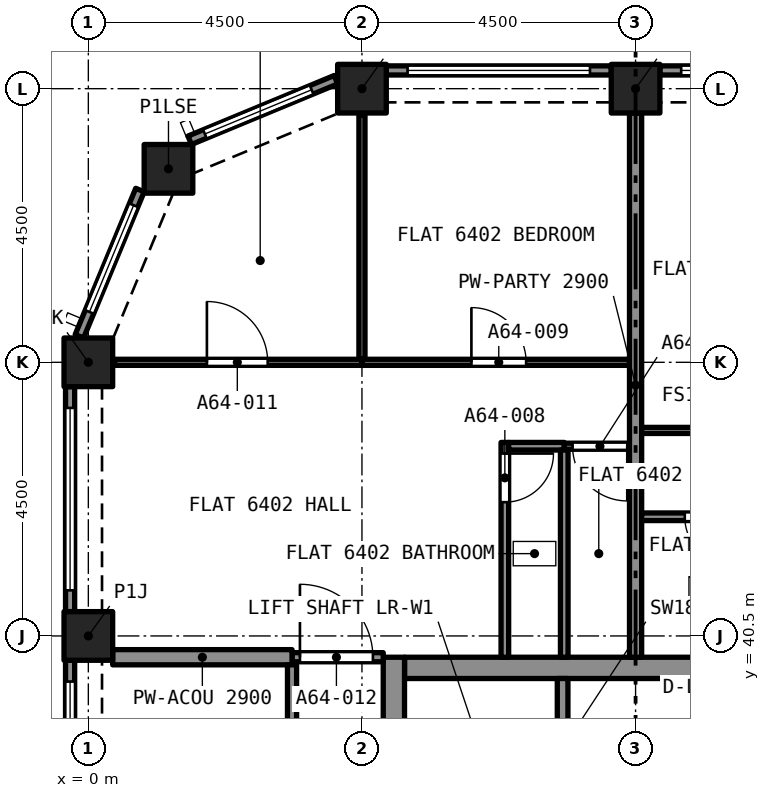
"""IFC4 building model, lengths in metres.
Left out: names, types, materials, properties, quantities, classifications, styles, units other than length and angle.
Written with IfcOpenShell. Run it as: python <this file> out.ifc"""

import sys

from ifc_helpers import new_model, si_unit, direction, frame, frame_2d, origin, origin_2d, place, context, subcontext, project, spatial, rectangle, extrude, element, fill, save


model = new_model("IFC4")
c1 = context("Model", 3, precision=1e-05, world=origin(), true_north=direction((0.0, 1.0)))
c2 = subcontext(c1, "Body", "Model", "MODEL_VIEW")
j1 = project(units=[si_unit("LENGTHUNIT", "METRE"), si_unit("PLANEANGLEUNIT", "RADIAN")], contexts=[c1])
p1 = place(None, origin())
s1 = spatial("IfcSite", under=j1, at=p1, CompositionType="ELEMENT")
p2 = place(p1, origin())
s2 = spatial("IfcBuilding", under=s1, at=p2, CompositionType="ELEMENT")
p3 = place(p2, frame((0.0, 0.0, 229.295)))
s3 = spatial("IfcBuildingStorey", under=s2, at=p3, CompositionType="ELEMENT", Elevation=229.295)
for number, where, z_axis, x_axis in (
    (1, (0.0, 40.5, 0.0), (0.0, 0.0, 1.0), (1.0, 0.0, 0.0)),
    (2, (0.0, 45.0, 0.0), (0.0, 0.0, 1.0), (1.0, 0.0, 0.0)),
    (3, (1.318, 48.182, 0.0), (0.0, 0.0, 1.0), (1.0, 0.0, 0.0)),
    (4, (4.5, 49.5, 0.0), (0.0, 0.0, 1.0), (1.0, 0.0, 0.0)),
    (5, (9.0, 49.5, 0.0), (0.0, 0.0, 1.0), (1.0, 0.0, 0.0)),
):
    element("IfcColumn", number, at=place(p3, frame(where, z_axis=z_axis, x_axis=x_axis)), inside=s3, PredefinedType="COLUMN", context=c2, shape_type="SweptSolid", body=[
        extrude(rectangle(XDim=0.8, YDim=0.8, at=origin_2d()), origin(), (0.0, 0.0, 1.0), 3.2),
    ])
p4 = place(p3, frame((5.2, 39.975, 0.0), z_axis=(0.0, 0.0, 1.0), x_axis=(1.0, 0.0, 0.0)))
e6 = element("IfcWall", 6, at=p4, inside=s3, PredefinedType="SOLIDWALL", context=c2, shape_type="SweptSolid", body=[
    extrude(rectangle(XDim=7.6, YDim=0.35, at=frame_2d((3.8, 0.0))), origin(), (0.0, 0.0, 1.0), 3.2),
])
p5 = place(p3, frame((5.025, 27.35, 0.0), z_axis=(0.0, 0.0, 1.0), x_axis=(0.0, 1.0, 0.0)))
e7 = element("IfcWall", 7, at=p5, inside=s3, PredefinedType="SOLIDWALL", context=c2, shape_type="SweptSolid", body=[
    extrude(rectangle(XDim=12.8, YDim=0.35, at=frame_2d((6.4, 0.0))), origin(), (0.0, 0.0, 1.0), 3.2),
])
p6 = place(p5, frame((8.6, 0.0, 0.0)))
e8 = element("IfcOpeningElement", 8, at=p6, cuts=e7, PredefinedType="OPENING", context=c2, shape_type="SweptSolid", body=[
    extrude(rectangle(XDim=1.2, YDim=2.1, at=frame_2d((0.6, 1.05))), frame((0.0, 0.185, 0.0), z_axis=(0.0, -1.0, 0.0), x_axis=(1.0, 0.0, 0.0)), (0.0, 0.0, 1.0), 0.37),
])
p7 = place(p3, frame((9.4, 49.8, 0.0), z_axis=(0.0, 0.0, 1.0), x_axis=(1.0, 0.0, 0.0)))
e9 = element("IfcWall", 9, at=p7, inside=s3, PredefinedType="SOLIDWALL", context=c2, shape_type="SweptSolid", body=[
    extrude(rectangle(XDim=3.7, YDim=0.15, at=frame_2d((1.85, 0.0))), origin(), (0.0, 0.0, 1.0), 3.2),
])
p8 = place(p7, frame((0.35, 0.0, 0.45)))
e10 = element("IfcOpeningElement", 10, at=p8, cuts=e9, PredefinedType="OPENING", context=c2, shape_type="SweptSolid", body=[
    extrude(rectangle(XDim=3.0, YDim=1.95, at=frame_2d((1.5, 0.975))), frame((0.0, 0.085, 0.0), z_axis=(0.0, -1.0, 0.0), x_axis=(1.0, 0.0, 0.0)), (0.0, 0.0, 1.0), 0.17),
])
p9 = place(p3, frame((4.9, 49.8, 0.0), z_axis=(0.0, 0.0, 1.0), x_axis=(1.0, 0.0, 0.0)))
e11 = element("IfcWall", 11, at=p9, inside=s3, PredefinedType="SOLIDWALL", context=c2, shape_type="SweptSolid", body=[
    extrude(rectangle(XDim=3.7, YDim=0.15, at=frame_2d((1.85, 0.0))), origin(), (0.0, 0.0, 1.0), 3.2),
])
p10 = place(p9, frame((0.35, 0.0, 0.45)))
e12 = element("IfcOpeningElement", 12, at=p10, cuts=e11, PredefinedType="OPENING", context=c2, shape_type="SweptSolid", body=[
    extrude(rectangle(XDim=3.0, YDim=1.95, at=frame_2d((1.5, 0.975))), frame((0.0, 0.085, 0.0), z_axis=(0.0, -1.0, 0.0), x_axis=(1.0, 0.0, 0.0)), (0.0, 0.0, 1.0), 0.17),
])
p11 = place(p3, frame((1.667, 48.651, 0.0), z_axis=(0.0, 0.0, 1.0), x_axis=(0.923885342263, 0.382669406082, 0.0)))
e13 = element("IfcWall", 13, at=p11, inside=s3, PredefinedType="SOLIDWALL", context=c2, shape_type="SweptSolid", body=[
    extrude(rectangle(XDim=2.602, YDim=0.15, at=frame_2d((1.301, 0.0))), origin(), (0.0, 0.0, 1.0), 3.2),
])
p12 = place(p11, frame((0.27, 0.0, 0.45)))
e14 = element("IfcOpeningElement", 14, at=p12, cuts=e13, PredefinedType="OPENING", context=c2, shape_type="SweptSolid", body=[
    extrude(rectangle(XDim=1.9, YDim=1.95, at=frame_2d((0.95, 0.975))), frame((0.0, 0.085, 0.0), z_axis=(0.0, -1.0, 0.0), x_axis=(1.0, 0.0, 0.0)), (0.0, 0.0, 1.0), 0.17),
])
p13 = place(p3, frame((-0.147, 45.429, 0.0), z_axis=(0.0, 0.0, 1.0), x_axis=(0.382669406082, 0.923885342263, 0.0)))
e15 = element("IfcWall", 15, at=p13, inside=s3, PredefinedType="SOLIDWALL", context=c2, shape_type="SweptSolid", body=[
    extrude(rectangle(XDim=2.602, YDim=0.15, at=frame_2d((1.301, 0.0))), origin(), (0.0, 0.0, 1.0), 3.2),
])
p14 = place(p13, frame((0.432, 0.0, 0.45)))
e16 = element("IfcOpeningElement", 16, at=p14, cuts=e15, PredefinedType="OPENING", context=c2, shape_type="SweptSolid", body=[
    extrude(rectangle(XDim=1.9, YDim=1.95, at=frame_2d((0.95, 0.975))), frame((0.0, 0.085, 0.0), z_axis=(0.0, -1.0, 0.0), x_axis=(1.0, 0.0, 0.0)), (0.0, 0.0, 1.0), 0.17),
])
p15 = place(p3, frame((-0.3, 40.9, 0.0), z_axis=(0.0, 0.0, 1.0), x_axis=(0.0, 1.0, 0.0)))
e17 = element("IfcWall", 17, at=p15, inside=s3, PredefinedType="SOLIDWALL", context=c2, shape_type="SweptSolid", body=[
    extrude(rectangle(XDim=3.7, YDim=0.15, at=frame_2d((1.85, 0.0))), origin(), (0.0, 0.0, 1.0), 3.2),
])
p16 = place(p15, frame((0.35, 0.0, 0.45)))
e18 = element("IfcOpeningElement", 18, at=p16, cuts=e17, PredefinedType="OPENING", context=c2, shape_type="SweptSolid", body=[
    extrude(rectangle(XDim=3.0, YDim=1.95, at=frame_2d((1.5, 0.975))), frame((0.0, 0.085, 0.0), z_axis=(0.0, -1.0, 0.0), x_axis=(1.0, 0.0, 0.0)), (0.0, 0.0, 1.0), 0.17),
])
p17 = place(p3, frame((-0.3, 36.4, 0.0), z_axis=(0.0, 0.0, 1.0), x_axis=(0.0, 1.0, 0.0)))
e19 = element("IfcWall", 19, at=p17, inside=s3, PredefinedType="SOLIDWALL", context=c2, shape_type="SweptSolid", body=[
    extrude(rectangle(XDim=3.7, YDim=0.15, at=frame_2d((1.85, 0.0))), origin(), (0.0, 0.0, 1.0), 3.2),
])
p18 = place(p17, frame((0.35, 0.0, 0.45)))
e20 = element("IfcOpeningElement", 20, at=p18, cuts=e19, PredefinedType="OPENING", context=c2, shape_type="SweptSolid", body=[
    extrude(rectangle(XDim=3.0, YDim=1.95, at=frame_2d((1.5, 0.975))), frame((0.0, 0.085, 0.0), z_axis=(0.0, -1.0, 0.0), x_axis=(1.0, 0.0, 0.0)), (0.0, 0.0, 1.0), 0.17),
])
p19 = place(p3, frame((6.85, 43.683, 0.0), z_axis=(0.0, 0.0, 1.0), x_axis=(0.0, -1.0, 0.0)))
e21 = element("IfcWall", 21, at=p19, inside=s3, PredefinedType="PARTITIONING", context=c2, shape_type="SweptSolid", body=[
    extrude(rectangle(XDim=3.533, YDim=0.125, at=frame_2d((1.766, 0.0))), origin(), (0.0, 0.0, 1.0), 2.9),
])
p20 = place(p19, frame((0.183, 0.0, 0.0)))
e22 = element("IfcOpeningElement", 22, at=p20, cuts=e21, PredefinedType="OPENING", context=c2, shape_type="SweptSolid", body=[
    extrude(rectangle(XDim=0.8, YDim=2.1, at=frame_2d((0.4, 1.05))), frame((0.0, 0.073, 0.0), z_axis=(0.0, -1.0, 0.0), x_axis=(1.0, 0.0, 0.0)), (0.0, 0.0, 1.0), 0.145),
])
p21 = place(p3, frame((6.913, 43.62, 0.0), z_axis=(0.0, 0.0, 1.0), x_axis=(1.0, 0.0, 0.0)))
e23 = element("IfcWall", 23, at=p21, inside=s3, PredefinedType="PARTITIONING", context=c2, shape_type="SweptSolid", body=[
    extrude(rectangle(XDim=0.915, YDim=0.125, at=frame_2d((0.458, 0.0))), origin(), (0.0, 0.0, 1.0), 2.9),
])
p22 = place(p3, frame((7.827, 40.15, 0.0), z_axis=(0.0, 0.0, 1.0), x_axis=(0.0, 1.0, 0.0)))
e24 = element("IfcWall", 24, at=p22, inside=s3, PredefinedType="PARTITIONING", context=c2, shape_type="SweptSolid", body=[
    extrude(rectangle(XDim=3.408, YDim=0.125, at=frame_2d((1.704, 0.0))), origin(), (0.0, 0.0, 1.0), 2.9),
])
p23 = place(p3, frame((4.5, 45.0, 0.0), z_axis=(0.0, 0.0, 1.0), x_axis=(1.0, 0.0, 0.0)))
e25 = element("IfcWall", 25, at=p23, inside=s3, PredefinedType="PARTITIONING", context=c2, shape_type="SweptSolid", body=[
    extrude(rectangle(XDim=4.4, YDim=0.1, at=frame_2d((2.2, 0.0))), origin(), (0.0, 0.0, 1.0), 2.9),
])
p24 = place(p23, frame((1.8, 0.0, 0.0)))
e26 = element("IfcOpeningElement", 26, at=p24, cuts=e25, PredefinedType="OPENING", context=c2, shape_type="SweptSolid", body=[
    extrude(rectangle(XDim=0.9, YDim=2.1, at=frame_2d((0.45, 1.05))), frame((0.0, 0.06, 0.0), z_axis=(0.0, -1.0, 0.0), x_axis=(1.0, 0.0, 0.0)), (0.0, 0.0, 1.0), 0.12),
])
p25 = place(p3, frame((4.5, 45.05, 0.0), z_axis=(0.0, 0.0, 1.0), x_axis=(0.0, 1.0, 0.0)))
e27 = element("IfcWall", 27, at=p25, inside=s3, PredefinedType="PARTITIONING", context=c2, shape_type="SweptSolid", body=[
    extrude(rectangle(XDim=4.017, YDim=0.1, at=frame_2d((2.009, 0.0))), origin(), (0.0, 0.0, 1.0), 2.9),
])
p26 = place(p3, frame((8.9, 43.62, 0.0), z_axis=(0.0, 0.0, 1.0), x_axis=(-1.0, 0.0, 0.0)))
e28 = element("IfcWall", 28, at=p26, inside=s3, PredefinedType="PARTITIONING", context=c2, shape_type="SweptSolid", body=[
    extrude(rectangle(XDim=1.073, YDim=0.1, at=frame_2d((0.536, 0.0))), origin(), (0.0, 0.0, 1.0), 2.9),
])
p27 = place(p26, frame((0.036, 0.0, 0.0)))
e29 = element("IfcOpeningElement", 29, at=p27, cuts=e28, PredefinedType="OPENING", context=c2, shape_type="SweptSolid", body=[
    extrude(rectangle(XDim=0.9, YDim=2.1, at=frame_2d((0.45, 1.05))), frame((0.0, 0.06, 0.0), z_axis=(0.0, -1.0, 0.0), x_axis=(1.0, 0.0, 0.0)), (0.0, 0.0, 1.0), 0.12),
])
p28 = place(p3, frame((0.433, 45.0, 0.0), z_axis=(0.0, 0.0, 1.0), x_axis=(1.0, 0.0, 0.0)))
e30 = element("IfcWall", 30, at=p28, inside=s3, PredefinedType="PARTITIONING", context=c2, shape_type="SweptSolid", body=[
    extrude(rectangle(XDim=4.067, YDim=0.1, at=frame_2d((2.034, 0.0))), origin(), (0.0, 0.0, 1.0), 2.9),
])
p29 = place(p28, frame((1.517, 0.0, 0.0)))
e31 = element("IfcOpeningElement", 31, at=p29, cuts=e30, PredefinedType="OPENING", context=c2, shape_type="SweptSolid", body=[
    extrude(rectangle(XDim=1.0, YDim=2.1, at=frame_2d((0.5, 1.05))), frame((0.0, 0.06, 0.0), z_axis=(0.0, -1.0, 0.0), x_axis=(1.0, 0.0, 0.0)), (0.0, 0.0, 1.0), 0.12),
])
p30 = place(p3, frame((3.35, 40.15, 0.0), z_axis=(0.0, 0.0, 1.0), x_axis=(1.0, 0.0, 0.0)))
e32 = element("IfcWall", 32, at=p30, inside=s3, PredefinedType="PARTITIONING", context=c2, shape_type="SweptSolid", body=[
    extrude(rectangle(XDim=1.5, YDim=0.15, at=frame_2d((0.75, 0.0))), origin(), (0.0, 0.0, 1.0), 2.9),
])
p31 = place(p30, frame((0.13, 0.0, 0.0)))
e33 = element("IfcOpeningElement", 33, at=p31, cuts=e32, PredefinedType="OPENING", context=c2, shape_type="SweptSolid", body=[
    extrude(rectangle(XDim=1.2, YDim=2.4, at=frame_2d((0.6, 1.2))), frame((0.0, 0.085, 0.0), z_axis=(0.0, -1.0, 0.0), x_axis=(1.0, 0.0, 0.0)), (0.0, 0.0, 1.0), 0.17),
])
p32 = place(p3, frame((0.4, 40.15, 0.0), z_axis=(0.0, 0.0, 1.0), x_axis=(1.0, 0.0, 0.0)))
e34 = element("IfcWall", 34, at=p32, inside=s3, PredefinedType="PARTITIONING", context=c2, shape_type="SweptSolid", body=[
    extrude(rectangle(XDim=2.95, YDim=0.25, at=frame_2d((1.475, 0.0))), origin(), (0.0, 0.0, 1.0), 2.9),
])
p33 = place(p3, frame((9.0, 40.15, 0.0), z_axis=(0.0, 0.0, 1.0), x_axis=(0.0, 1.0, 0.0)))
e35 = element("IfcWall", 35, at=p33, inside=s3, PredefinedType="PARTITIONING", context=c2, shape_type="SweptSolid", body=[
    extrude(rectangle(XDim=8.95, YDim=0.2, at=frame_2d((4.475, 0.0))), origin(), (0.0, 0.0, 1.0), 2.9),
])
p34 = place(p3, frame((11.418, 42.46, 0.0), z_axis=(0.0, 0.0, 1.0), x_axis=(-1.0, 0.0, 0.0)))
e36 = element("IfcWall", 36, at=p34, inside=s3, PredefinedType="PARTITIONING", context=c2, shape_type="SweptSolid", body=[
    extrude(rectangle(XDim=2.318, YDim=0.125, at=frame_2d((1.159, 0.0))), origin(), (0.0, 0.0, 1.0), 2.9),
])
p35 = place(p34, frame((0.809, 0.0, 0.0)))
e37 = element("IfcOpeningElement", 37, at=p35, cuts=e36, PredefinedType="OPENING", context=c2, shape_type="SweptSolid", body=[
    extrude(rectangle(XDim=0.8, YDim=2.1, at=frame_2d((0.4, 1.05))), frame((0.0, 0.073, 0.0), z_axis=(0.0, -1.0, 0.0), x_axis=(1.0, 0.0, 0.0)), (0.0, 0.0, 1.0), 0.145),
])
p36 = place(p3, frame((9.1, 43.88, 0.0), z_axis=(0.0, 0.0, 1.0), x_axis=(1.0, 0.0, 0.0)))
e38 = element("IfcWall", 38, at=p36, inside=s3, PredefinedType="PARTITIONING", context=c2, shape_type="SweptSolid", body=[
    extrude(rectangle(XDim=4.4, YDim=0.1, at=frame_2d((2.2, 0.0))), origin(), (0.0, 0.0, 1.0), 2.9),
])
p37 = place(p36, frame((1.65, 0.0, 0.0)))
e39 = element("IfcOpeningElement", 39, at=p37, cuts=e38, PredefinedType="OPENING", context=c2, shape_type="SweptSolid", body=[
    extrude(rectangle(XDim=1.0, YDim=2.1, at=frame_2d((0.5, 1.05))), frame((0.0, 0.06, 0.0), z_axis=(0.0, -1.0, 0.0), x_axis=(1.0, 0.0, 0.0)), (0.0, 0.0, 1.0), 0.12),
])
p38 = place(p3, frame((3.35, 36.0, 0.0), z_axis=(0.0, 0.0, 1.0), x_axis=(0.0, 1.0, 0.0)))
e40 = element("IfcWall", 40, at=p38, inside=s3, PredefinedType="PARTITIONING", context=c2, shape_type="SweptSolid", body=[
    extrude(rectangle(XDim=4.025, YDim=0.15, at=frame_2d((2.012, 0.0))), origin(), (0.0, 0.0, 1.0), 2.9),
])
p39 = place(p38, frame((1.575, 0.0, 0.0)))
e41 = element("IfcOpeningElement", 41, at=p39, cuts=e40, PredefinedType="OPENING", context=c2, shape_type="SweptSolid", body=[
    extrude(rectangle(XDim=1.0, YDim=2.1, at=frame_2d((0.5, 1.05))), frame((0.0, 0.085, 0.0), z_axis=(0.0, -1.0, 0.0), x_axis=(1.0, 0.0, 0.0)), (0.0, 0.0, 1.0), 0.17),
])
p40 = place(p3, frame((7.8, 37.5, 0.0), z_axis=(0.0, 0.0, 1.0), x_axis=(0.0, 1.0, 0.0)))
e42 = element("IfcWall", 42, at=p40, inside=s3, PredefinedType="SOLIDWALL", context=c2, shape_type="SweptSolid", body=[
    extrude(rectangle(XDim=2.3, YDim=0.175, at=frame_2d((1.15, 0.0))), origin(), (0.0, 0.0, 1.0), 2.9),
])
p41 = place(p8, origin())
e43 = element("IfcWindow", 43, at=p41, inside=s3, PartitioningType="SINGLE_PANEL", PredefinedType="WINDOW", context=c2, shape_type="SweptSolid", body=[
    extrude(rectangle(XDim=3.0, YDim=1.95, at=frame_2d((1.5, 0.975))), frame((0.0, 0.03, 0.0), z_axis=(0.0, -1.0, 0.0), x_axis=(1.0, 0.0, 0.0)), (0.0, 0.0, 1.0), 0.06),
])
fill(e10, e43)
p42 = place(p10, origin())
e44 = element("IfcWindow", 44, at=p42, inside=s3, PartitioningType="SINGLE_PANEL", PredefinedType="WINDOW", context=c2, shape_type="SweptSolid", body=[
    extrude(rectangle(XDim=3.0, YDim=1.95, at=frame_2d((1.5, 0.975))), frame((0.0, 0.03, 0.0), z_axis=(0.0, -1.0, 0.0), x_axis=(1.0, 0.0, 0.0)), (0.0, 0.0, 1.0), 0.06),
])
fill(e12, e44)
p43 = place(p12, origin())
e45 = element("IfcWindow", 45, at=p43, inside=s3, PartitioningType="SINGLE_PANEL", PredefinedType="WINDOW", context=c2, shape_type="SweptSolid", body=[
    extrude(rectangle(XDim=1.9, YDim=1.95, at=frame_2d((0.95, 0.975))), frame((0.0, 0.03, 0.0), z_axis=(0.0, -1.0, 0.0), x_axis=(1.0, 0.0, 0.0)), (0.0, 0.0, 1.0), 0.06),
])
fill(e14, e45)
p44 = place(p14, origin())
e46 = element("IfcWindow", 46, at=p44, inside=s3, PartitioningType="SINGLE_PANEL", PredefinedType="WINDOW", context=c2, shape_type="SweptSolid", body=[
    extrude(rectangle(XDim=1.9, YDim=1.95, at=frame_2d((0.95, 0.975))), frame((0.0, 0.03, 0.0), z_axis=(0.0, -1.0, 0.0), x_axis=(1.0, 0.0, 0.0)), (0.0, 0.0, 1.0), 0.06),
])
fill(e16, e46)
p45 = place(p16, origin())
e47 = element("IfcWindow", 47, at=p45, inside=s3, PartitioningType="SINGLE_PANEL", PredefinedType="WINDOW", context=c2, shape_type="SweptSolid", body=[
    extrude(rectangle(XDim=3.0, YDim=1.95, at=frame_2d((1.5, 0.975))), frame((0.0, 0.03, 0.0), z_axis=(0.0, -1.0, 0.0), x_axis=(1.0, 0.0, 0.0)), (0.0, 0.0, 1.0), 0.06),
])
fill(e18, e47)
p46 = place(p18, origin())
e48 = element("IfcWindow", 48, at=p46, inside=s3, PartitioningType="SINGLE_PANEL", PredefinedType="WINDOW", context=c2, shape_type="SweptSolid", body=[
    extrude(rectangle(XDim=3.0, YDim=1.95, at=frame_2d((1.5, 0.975))), frame((0.0, 0.03, 0.0), z_axis=(0.0, -1.0, 0.0), x_axis=(1.0, 0.0, 0.0)), (0.0, 0.0, 1.0), 0.06),
])
fill(e20, e48)
p47 = place(p20, origin())
e49 = element("IfcDoor", 49, at=p47, inside=s3, OperationType="SINGLE_SWING_LEFT", PredefinedType="DOOR", context=c2, shape_type="SweptSolid", body=[
    extrude(rectangle(XDim=0.8, YDim=2.1, at=frame_2d((0.4, 1.05))), frame((0.0, 0.025, 0.0), z_axis=(0.0, -1.0, 0.0), x_axis=(1.0, 0.0, 0.0)), (0.0, 0.0, 1.0), 0.05),
])
fill(e22, e49)
p48 = place(p24, origin())
e50 = element("IfcDoor", 50, at=p48, inside=s3, OperationType="SINGLE_SWING_RIGHT", PredefinedType="DOOR", context=c2, shape_type="SweptSolid", body=[
    extrude(rectangle(XDim=0.9, YDim=2.1, at=frame_2d((0.45, 1.05))), frame((0.0, 0.025, 0.0), z_axis=(0.0, -1.0, 0.0), x_axis=(1.0, 0.0, 0.0)), (0.0, 0.0, 1.0), 0.05),
])
fill(e26, e50)
p49 = place(p27, origin())
e51 = element("IfcDoor", 51, at=p49, inside=s3, OperationType="SINGLE_SWING_LEFT", PredefinedType="DOOR", context=c2, shape_type="SweptSolid", body=[
    extrude(rectangle(XDim=0.9, YDim=2.1, at=frame_2d((0.45, 1.05))), frame((0.0, 0.025, 0.0), z_axis=(0.0, -1.0, 0.0), x_axis=(1.0, 0.0, 0.0)), (0.0, 0.0, 1.0), 0.05),
])
fill(e29, e51)
p50 = place(p29, origin())
e52 = element("IfcDoor", 52, at=p50, inside=s3, OperationType="SINGLE_SWING_LEFT", PredefinedType="DOOR", context=c2, shape_type="SweptSolid", body=[
    extrude(rectangle(XDim=1.0, YDim=2.1, at=frame_2d((0.5, 1.05))), frame((0.0, 0.025, 0.0), z_axis=(0.0, -1.0, 0.0), x_axis=(1.0, 0.0, 0.0)), (0.0, 0.0, 1.0), 0.05),
])
fill(e31, e52)
p51 = place(p31, origin())
e53 = element("IfcDoor", 53, at=p51, inside=s3, OperationType="SINGLE_SWING_LEFT", PredefinedType="DOOR", context=c2, shape_type="SweptSolid", body=[
    extrude(rectangle(XDim=1.2, YDim=2.4, at=frame_2d((0.6, 1.2))), frame((0.0, 0.025, 0.0), z_axis=(0.0, -1.0, 0.0), x_axis=(1.0, 0.0, 0.0)), (0.0, 0.0, 1.0), 0.05),
])
fill(e33, e53)
p52 = place(p35, origin())
e54 = element("IfcDoor", 54, at=p52, inside=s3, OperationType="SINGLE_SWING_RIGHT", PredefinedType="DOOR", context=c2, shape_type="SweptSolid", body=[
    extrude(rectangle(XDim=0.8, YDim=2.1, at=frame_2d((0.4, 1.05))), frame((0.0, 0.025, 0.0), z_axis=(0.0, -1.0, 0.0), x_axis=(1.0, 0.0, 0.0)), (0.0, 0.0, 1.0), 0.05),
])
fill(e37, e54)
save(model, sys.argv[1])
